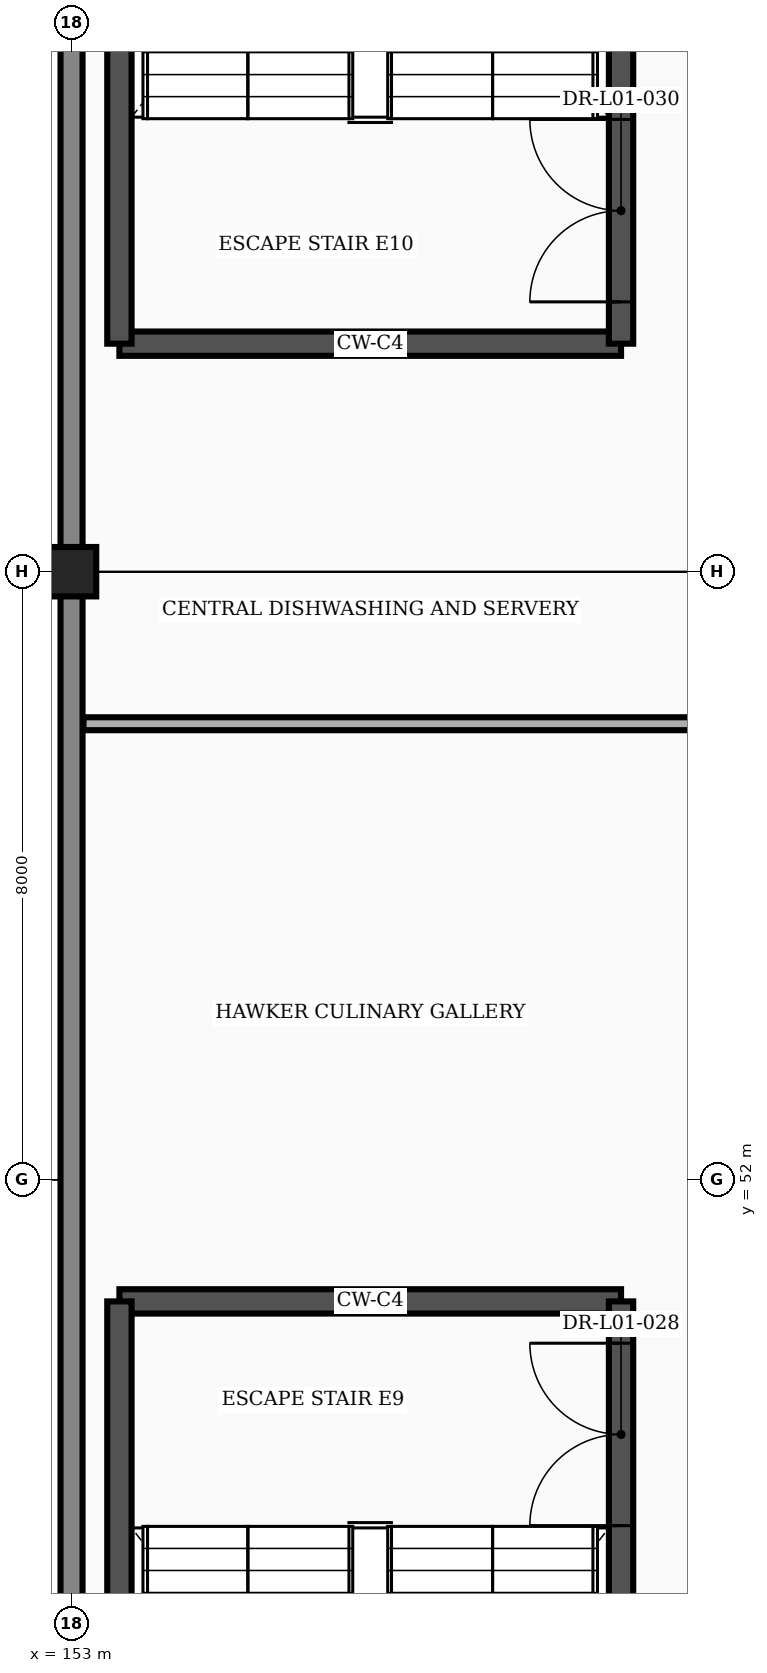
"""IFC4 building model, lengths in metres.
Left out: names, types, materials, properties, quantities, classifications, styles, units other than length and angle.
Written with IfcOpenShell. Run it as: python <this file> out.ifc"""

import sys

from ifc_helpers import new_model, si_unit, direction, frame, frame_2d, origin, origin_2d, place, context, subcontext, project, spatial, rectangle, extrude, element, fill, save


model = new_model("IFC4")
c1 = context("Model", 3, precision=1e-05, world=origin(), true_north=direction((0.0, 1.0)))
c2 = subcontext(c1, "Body", "Model", "MODEL_VIEW")
j1 = project(units=[si_unit("LENGTHUNIT", "METRE"), si_unit("PLANEANGLEUNIT", "RADIAN")], contexts=[c1])
p1 = place(None, origin())
s1 = spatial("IfcSite", under=j1, at=p1, CompositionType="ELEMENT")
p2 = place(p1, origin())
s2 = spatial("IfcBuilding", under=s1, at=p2, CompositionType="ELEMENT")
p3 = place(p2, frame((0.0, 0.0, 6.0)))
s3 = spatial("IfcBuildingStorey", under=s2, at=p3, CompositionType="ELEMENT", Elevation=6.0)
p4 = place(p3, frame((153.0, 60.0, 0.0), z_axis=(0.0, 0.0, 1.0), x_axis=(1.0, 0.0, 0.0)))
e1 = element("IfcColumn", 1, at=p4, inside=s3, PredefinedType="COLUMN", context=c2, shape_type="SweptSolid", body=[
    extrude(rectangle(XDim=0.65, YDim=0.65, at=origin_2d()), origin(), (0.0, 0.0, 1.0), 5.4),
])
for number, where, z_axis, x_axis in (
    (2, (153.0, 36.198, 0.0), (0.0, 0.0, 1.0), (0.0, 1.0, 0.0)),
    (3, (153.0, 60.317, 0.0), (0.0, 0.0, 1.0), (0.0, 1.0, 0.0)),
):
    element("IfcWall", number, at=place(p3, frame(where, z_axis=z_axis, x_axis=x_axis)), inside=s3, PredefinedType="STANDARD", context=c2, shape_type="SweptSolid", body=[
        extrude(rectangle(XDim=23.485, YDim=0.29, at=frame_2d((11.742, 0.0))), origin(), (0.0, 0.0, 1.0), 4.467),
    ])
p5 = place(p3, frame((153.63, 50.4, 0.0), z_axis=(0.0, 0.0, 1.0), x_axis=(1.0, 0.0, 0.0)))
e4 = element("IfcWall", 4, at=p5, inside=s3, PredefinedType="SHEAR", context=c2, shape_type="SweptSolid", body=[
    extrude(rectangle(XDim=6.6, YDim=0.32, at=frame_2d((3.3, 0.0))), origin(), (0.0, 0.0, 1.0), 5.15),
])
p6 = place(p3, frame((153.63, 39.2, 0.0), z_axis=(0.0, 0.0, 1.0), x_axis=(0.0, 1.0, 0.0)))
e5 = element("IfcWall", 5, at=p6, inside=s3, PredefinedType="SHEAR", context=c2, shape_type="SweptSolid", body=[
    extrude(rectangle(XDim=11.2, YDim=0.32, at=frame_2d((5.6, 0.0))), origin(), (0.0, 0.0, 1.0), 5.15),
])
p7 = place(p3, frame((160.23, 39.2, 0.0), z_axis=(0.0, 0.0, 1.0), x_axis=(0.0, 1.0, 0.0)))
e6 = element("IfcWall", 6, at=p7, inside=s3, PredefinedType="SHEAR", context=c2, shape_type="SweptSolid", body=[
    extrude(rectangle(XDim=11.2, YDim=0.32, at=frame_2d((5.6, 0.0))), origin(), (0.0, 0.0, 1.0), 5.15),
])
p8 = place(p7, frame((8.25, 0.0, 0.0)))
e7 = element("IfcOpeningElement", 7, at=p8, cuts=e6, PredefinedType="OPENING", context=c2, shape_type="SweptSolid", body=[
    extrude(rectangle(XDim=2.4, YDim=2.25, at=frame_2d((1.2, 1.125))), frame((0.0, 0.172, 0.0), z_axis=(0.0, -1.0, 0.0), x_axis=(1.0, 0.0, 0.0)), (0.0, 0.0, 1.0), 0.344),
])
p9 = place(p3, frame((153.63, 63.0, 0.0), z_axis=(0.0, 0.0, 1.0), x_axis=(1.0, 0.0, 0.0)))
e8 = element("IfcWall", 8, at=p9, inside=s3, PredefinedType="SHEAR", context=c2, shape_type="SweptSolid", body=[
    extrude(rectangle(XDim=6.6, YDim=0.32, at=frame_2d((3.3, 0.0))), origin(), (0.0, 0.0, 1.0), 5.15),
])
p10 = place(p3, frame((153.63, 63.0, 0.0), z_axis=(0.0, 0.0, 1.0), x_axis=(0.0, 1.0, 0.0)))
e9 = element("IfcWall", 9, at=p10, inside=s3, PredefinedType="SHEAR", context=c2, shape_type="SweptSolid", body=[
    extrude(rectangle(XDim=11.2, YDim=0.32, at=frame_2d((5.6, 0.0))), origin(), (0.0, 0.0, 1.0), 5.15),
])
p11 = place(p3, frame((160.23, 63.0, 0.0), z_axis=(0.0, 0.0, 1.0), x_axis=(0.0, 1.0, 0.0)))
e10 = element("IfcWall", 10, at=p11, inside=s3, PredefinedType="SHEAR", context=c2, shape_type="SweptSolid", body=[
    extrude(rectangle(XDim=11.2, YDim=0.32, at=frame_2d((5.6, 0.0))), origin(), (0.0, 0.0, 1.0), 5.15),
])
p12 = place(p11, frame((0.55, 0.0, 0.0)))
e11 = element("IfcOpeningElement", 11, at=p12, cuts=e10, PredefinedType="OPENING", context=c2, shape_type="SweptSolid", body=[
    extrude(rectangle(XDim=2.4, YDim=2.25, at=frame_2d((1.2, 1.125))), frame((0.0, 0.172, 0.0), z_axis=(0.0, -1.0, 0.0), x_axis=(1.0, 0.0, 0.0)), (0.0, 0.0, 1.0), 0.344),
])
p13 = place(p3, frame((153.157, 58.0, 0.0), z_axis=(0.0, 0.0, 1.0), x_axis=(1.0, 0.0, 0.0)))
e12 = element("IfcWall", 12, at=p13, inside=s3, PredefinedType="PARTITIONING", context=c2, shape_type="SweptSolid", body=[
    extrude(rectangle(XDim=18.282, YDim=0.17, at=frame_2d((9.141, 0.0))), origin(), (0.0, 0.0, 1.0), 5.15),
])
p14 = place(p8, origin())
e13 = element("IfcDoor", 13, at=p14, inside=s3, OperationType="DOUBLE_DOOR_SINGLE_SWING", PredefinedType="DOOR", context=c2, shape_type="SweptSolid", body=[
    extrude(rectangle(XDim=2.4, YDim=2.25, at=frame_2d((1.2, 1.125))), frame((0.0, 0.025, 0.0), z_axis=(0.0, -1.0, 0.0), x_axis=(1.0, 0.0, 0.0)), (0.0, 0.0, 1.0), 0.05),
])
fill(e7, e13)
p15 = place(p12, origin())
e14 = element("IfcDoor", 14, at=p15, inside=s3, OperationType="DOUBLE_DOOR_SINGLE_SWING", PredefinedType="DOOR", context=c2, shape_type="SweptSolid", body=[
    extrude(rectangle(XDim=2.4, YDim=2.25, at=frame_2d((1.2, 1.125))), frame((0.0, 0.025, 0.0), z_axis=(0.0, -1.0, 0.0), x_axis=(1.0, 0.0, 0.0)), (0.0, 0.0, 1.0), 0.05),
])
fill(e11, e14)
save(model, sys.argv[1])
